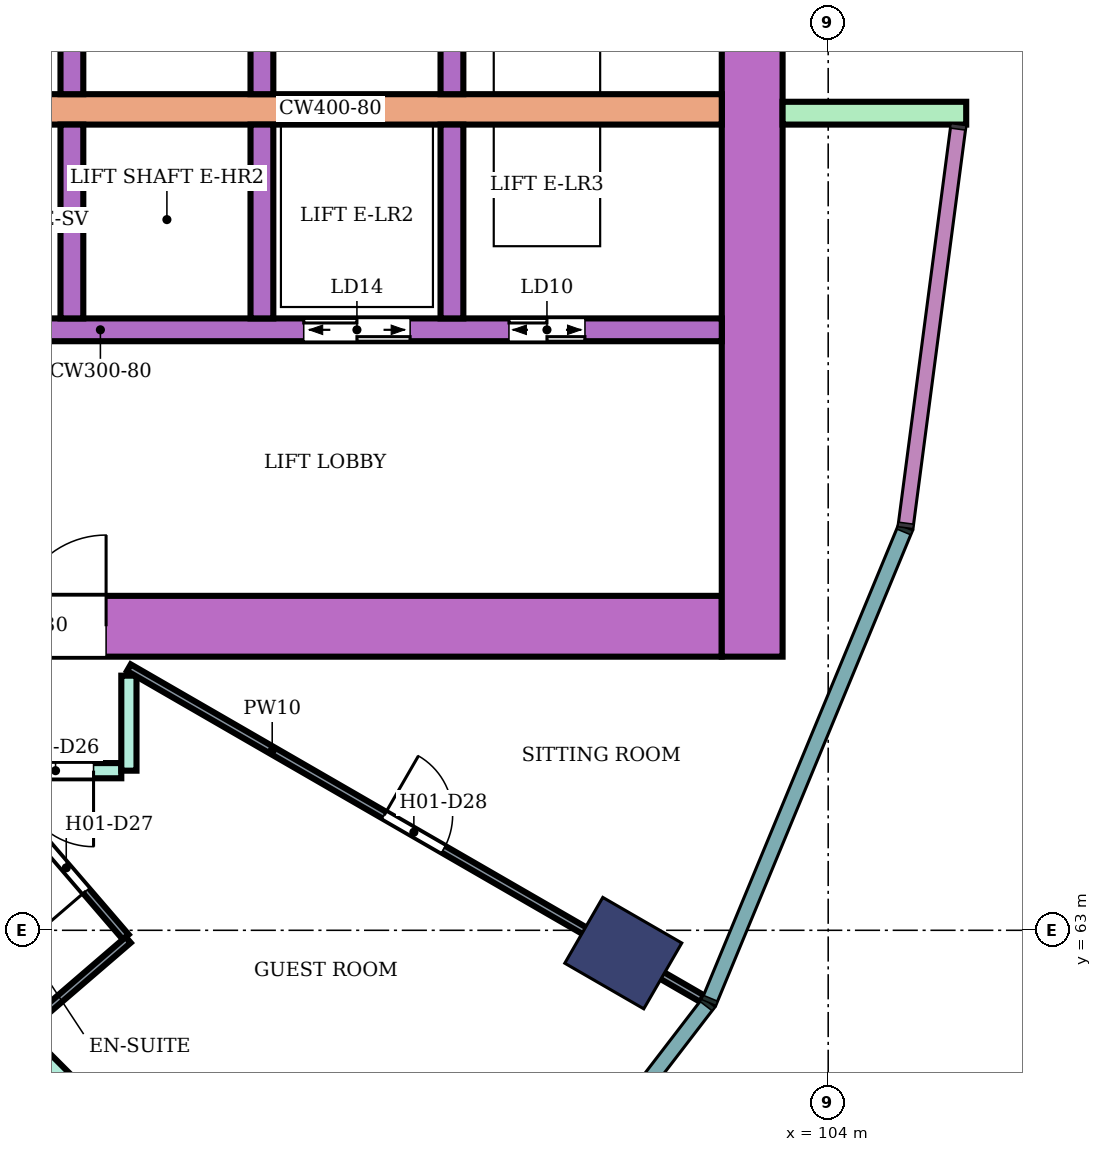
"""IFC4 building model, lengths in metres.
Left out: names, types, materials, properties, quantities, classifications, styles, units other than length and angle.
Written with IfcOpenShell. Run it as: python <this file> out.ifc"""

import sys

from ifc_helpers import new_model, si_unit, direction, frame, frame_2d, origin, origin_2d, place, context, subcontext, project, spatial, rectangle, extrude, element, fill, save


model = new_model("IFC4")
c1 = context("Model", 3, precision=1e-05, world=origin(), true_north=direction((0.0, 1.0)))
c2 = subcontext(c1, "Body", "Model", "MODEL_VIEW")
j1 = project(units=[si_unit("LENGTHUNIT", "METRE"), si_unit("PLANEANGLEUNIT", "RADIAN")], contexts=[c1])
p1 = place(None, origin())
s1 = spatial("IfcSite", under=j1, at=p1, CompositionType="ELEMENT")
p2 = place(p1, origin())
s2 = spatial("IfcBuilding", under=s1, at=p2, CompositionType="ELEMENT")
p3 = place(p2, frame((0.0, 0.0, 36.4)))
s3 = spatial("IfcBuildingStorey", under=s2, at=p3, CompositionType="ELEMENT", Elevation=36.4)
p4 = place(p3, frame((101.304, 62.7, 0.0), z_axis=(0.0, 0.0, 1.0), x_axis=(0.866025403784, -0.5, 0.0)))
e1 = element("IfcColumn", 1, at=p4, inside=s3, PredefinedType="COLUMN", context=c2, shape_type="SweptSolid", body=[
    extrude(rectangle(XDim=1.2, YDim=1.0, at=origin_2d()), origin(), (0.0, 0.0, 1.0), 3.8),
])
p5 = place(p3, frame((87.9, 67.0, 0.0), z_axis=(0.0, 0.0, 1.0), x_axis=(1.0, 0.0, 0.0)))
e2 = element("IfcWall", 2, at=p5, inside=s3, PredefinedType="SHEAR", context=c2, shape_type="SweptSolid", body=[
    extrude(rectangle(XDim=14.7, YDim=0.8, at=frame_2d((7.35, 0.0))), origin(), (0.0, 0.0, 1.0), 3.48),
])
p6 = place(p5, frame((4.2, 0.0, 0.0)))
e3 = element("IfcOpeningElement", 3, at=p6, cuts=e2, PredefinedType="OPENING", context=c2, shape_type="SweptSolid", body=[
    extrude(rectangle(XDim=2.4, YDim=2.4, at=frame_2d((1.2, 1.2))), frame((0.0, 0.41, 0.0), z_axis=(0.0, -1.0, 0.0), x_axis=(1.0, 0.0, 0.0)), (0.0, 0.0, 1.0), 0.82),
])
p7 = place(p3, frame((103.0, 66.6, 0.0), z_axis=(0.0, 0.0, 1.0), x_axis=(0.0, 1.0, 0.0)))
e4 = element("IfcWall", 4, at=p7, inside=s3, PredefinedType="SHEAR", context=c2, shape_type="SweptSolid", body=[
    extrude(rectangle(XDim=16.8, YDim=0.8, at=frame_2d((8.4, 0.0))), origin(), (0.0, 0.0, 1.0), 3.48),
])
p8 = place(p3, frame((91.7, 73.8, 0.0), z_axis=(0.0, 0.0, 1.0), x_axis=(1.0, 0.0, 0.0)))
e5 = element("IfcWall", 5, at=p8, inside=s3, PredefinedType="SHEAR", context=c2, shape_type="SweptSolid", body=[
    extrude(rectangle(XDim=10.9, YDim=0.4, at=frame_2d((5.45, 0.0))), origin(), (0.0, 0.0, 1.0), 3.48),
])
p9 = place(p3, frame((91.7, 70.9, 0.0), z_axis=(0.0, 0.0, 1.0), x_axis=(1.0, 0.0, 0.0)))
e6 = element("IfcWall", 6, at=p9, inside=s3, PredefinedType="SHEAR", context=c2, shape_type="SweptSolid", body=[
    extrude(rectangle(XDim=10.9, YDim=0.3, at=frame_2d((5.45, 0.0))), origin(), (0.0, 0.0, 1.0), 3.48),
])
p10 = place(p9, frame((0.4, 0.0, 0.0)))
e7 = element("IfcOpeningElement", 7, at=p10, cuts=e6, PredefinedType="OPENING", context=c2, shape_type="SweptSolid", body=[
    extrude(rectangle(XDim=1.4, YDim=2.1, at=frame_2d((0.7, 1.05))), frame((0.0, 0.16, 0.0), z_axis=(0.0, -1.0, 0.0), x_axis=(1.0, 0.0, 0.0)), (0.0, 0.0, 1.0), 0.32),
])
p11 = place(p9, frame((5.4, 0.0, 0.0)))
e8 = element("IfcOpeningElement", 8, at=p11, cuts=e6, PredefinedType="OPENING", context=c2, shape_type="SweptSolid", body=[
    extrude(rectangle(XDim=1.4, YDim=2.1, at=frame_2d((0.7, 1.05))), frame((0.0, 0.16, 0.0), z_axis=(0.0, -1.0, 0.0), x_axis=(1.0, 0.0, 0.0)), (0.0, 0.0, 1.0), 0.32),
])
p12 = place(p9, frame((8.1, 0.0, 0.0)))
e9 = element("IfcOpeningElement", 9, at=p12, cuts=e6, PredefinedType="OPENING", context=c2, shape_type="SweptSolid", body=[
    extrude(rectangle(XDim=1.0, YDim=2.1, at=frame_2d((0.5, 1.05))), frame((0.0, 0.16, 0.0), z_axis=(0.0, -1.0, 0.0), x_axis=(1.0, 0.0, 0.0)), (0.0, 0.0, 1.0), 0.32),
])
for number, where, z_axis, x_axis in (
    (10, (94.05, 74.0, 0.0), (0.0, 0.0, 1.0), (0.0, 1.0, 0.0)),
    (11, (96.55, 74.0, 0.0), (0.0, 0.0, 1.0), (0.0, 1.0, 0.0)),
    (12, (99.05, 74.0, 0.0), (0.0, 0.0, 1.0), (0.0, 1.0, 0.0)),
    (13, (94.05, 71.05, 0.0), (0.0, 0.0, 1.0), (0.0, 1.0, 0.0)),
    (14, (96.55, 71.05, 0.0), (0.0, 0.0, 1.0), (0.0, 1.0, 0.0)),
    (15, (99.05, 71.05, 0.0), (0.0, 0.0, 1.0), (0.0, 1.0, 0.0)),
):
    element("IfcWall", number, at=place(p3, frame(where, z_axis=z_axis, x_axis=x_axis)), inside=s3, PredefinedType="SHEAR", context=c2, shape_type="SweptSolid", body=[
        extrude(rectangle(XDim=2.55, YDim=0.3, at=frame_2d((1.275, 0.0))), origin(), (0.0, 0.0, 1.0), 3.48),
    ])
p13 = place(p3, frame((103.4, 73.75, 0.0), z_axis=(0.0, 0.0, 1.0), x_axis=(1.0, 0.0, 0.0)))
e16 = element("IfcWall", 16, at=p13, inside=s3, PredefinedType="NOTDEFINED", context=c2, shape_type="SweptSolid", body=[
    extrude(rectangle(XDim=2.416, YDim=0.3, at=frame_2d((1.208, 0.0))), origin(), (0.0, 0.0, 1.0), 3.8),
])
p14 = place(p3, frame((91.449, 63.548, 0.0), z_axis=(0.0, 0.0, 1.0), x_axis=(0.706984804638, -0.707228736698, 0.0)))
e17 = element("IfcWall", 17, at=p14, inside=s3, PredefinedType="PARTITIONING", context=c2, shape_type="SweptSolid", body=[
    extrude(rectangle(XDim=7.006, YDim=0.2, at=frame_2d((3.503, 0.0))), origin(), (0.0, 0.0, 1.0), 3.35),
])
p15 = place(p3, frame((93.085, 65.1, 0.0), z_axis=(0.0, 0.0, 1.0), x_axis=(1.0, 0.0, 0.0)))
e18 = element("IfcWall", 18, at=p15, inside=s3, PredefinedType="PARTITIONING", context=c2, shape_type="SweptSolid", body=[
    extrude(rectangle(XDim=1.615, YDim=0.2, at=frame_2d((0.808, 0.0))), origin(), (0.0, 0.0, 1.0), 3.35),
])
p16 = place(p15, frame((0.25, 0.0, 0.0)))
e19 = element("IfcOpeningElement", 19, at=p16, cuts=e18, PredefinedType="OPENING", context=c2, shape_type="SweptSolid", body=[
    extrude(rectangle(XDim=1.0, YDim=2.1, at=frame_2d((0.5, 1.05))), frame((0.0, 0.11, 0.0), z_axis=(0.0, -1.0, 0.0), x_axis=(1.0, 0.0, 0.0)), (0.0, 0.0, 1.0), 0.22),
])
p17 = place(p3, frame((94.8, 65.1, 0.0), z_axis=(0.0, 0.0, 1.0), x_axis=(0.0, 1.0, 0.0)))
e20 = element("IfcWall", 20, at=p17, inside=s3, PredefinedType="PARTITIONING", context=c2, shape_type="SweptSolid", body=[
    extrude(rectangle(XDim=1.25, YDim=0.2, at=frame_2d((0.625, 0.0))), origin(), (0.0, 0.0, 1.0), 3.35),
])
p18 = place(p3, frame((92.965, 64.997, 0.0), z_axis=(0.0, 0.0, 1.0), x_axis=(0.652069888227, -0.758158862553, 0.0)))
e21 = element("IfcWall", 21, at=p18, inside=s3, PredefinedType="PARTITIONING", context=c2, shape_type="SweptSolid", body=[
    extrude(rectangle(XDim=2.75, YDim=0.1, at=frame_2d((1.375, 0.0))), origin(), (0.0, 0.0, 1.0), 3.35),
])
p19 = place(p18, frame((1.15, 0.0, 0.0)))
e22 = element("IfcOpeningElement", 22, at=p19, cuts=e21, PredefinedType="OPENING", context=c2, shape_type="SweptSolid", body=[
    extrude(rectangle(XDim=0.8, YDim=2.1, at=frame_2d((0.4, 1.05))), frame((0.0, 0.06, 0.0), z_axis=(0.0, -1.0, 0.0), x_axis=(1.0, 0.0, 0.0)), (0.0, 0.0, 1.0), 0.12),
])
p20 = place(p3, frame((93.435, 61.707, 0.0), z_axis=(0.0, 0.0, 1.0), x_axis=(0.758070495124, 0.652172618578, 0.0)))
e23 = element("IfcWall", 23, at=p20, inside=s3, PredefinedType="PARTITIONING", context=c2, shape_type="SweptSolid", body=[
    extrude(rectangle(XDim=1.789, YDim=0.1, at=frame_2d((0.895, 0.0))), origin(), (0.0, 0.0, 1.0), 3.35),
])
p21 = place(p3, frame((94.8, 66.455, 0.0), z_axis=(0.0, 0.0, 1.0), x_axis=(0.86602264145, -0.500004784474, 0.0)))
e24 = element("IfcWall", 24, at=p21, inside=s3, PredefinedType="PARTITIONING", context=c2, shape_type="SweptSolid", body=[
    extrude(rectangle(XDim=8.708, YDim=0.1, at=frame_2d((4.354, 0.0))), origin(), (0.0, 0.0, 1.0), 3.35),
])
p22 = place(p21, frame((3.879, 0.0, 0.0)))
e25 = element("IfcOpeningElement", 25, at=p22, cuts=e24, PredefinedType="OPENING", context=c2, shape_type="SweptSolid", body=[
    extrude(rectangle(XDim=0.9, YDim=2.1, at=frame_2d((0.45, 1.05))), frame((0.0, 0.06, 0.0), z_axis=(0.0, -1.0, 0.0), x_axis=(1.0, 0.0, 0.0)), (0.0, 0.0, 1.0), 0.12),
])
p23 = place(p16, frame((1.0, 0.0, 0.0), z_axis=(0.0, 0.0, 1.0), x_axis=(-1.0, 0.0, 0.0)))
e26 = element("IfcDoor", 26, at=p23, inside=s3, OperationType="SINGLE_SWING_LEFT", PredefinedType="DOOR", context=c2, shape_type="SweptSolid", body=[
    extrude(rectangle(XDim=1.0, YDim=2.1, at=frame_2d((0.5, 1.05))), frame((0.0, 0.025, 0.0), z_axis=(0.0, -1.0, 0.0), x_axis=(1.0, 0.0, 0.0)), (0.0, 0.0, 1.0), 0.05),
])
fill(e19, e26)
p24 = place(p19, frame((0.8, 0.0, 0.0), z_axis=(0.0, 0.0, 1.0), x_axis=(-1.0, 0.0, 0.0)))
e27 = element("IfcDoor", 27, at=p24, inside=s3, OperationType="SINGLE_SWING_LEFT", PredefinedType="DOOR", context=c2, shape_type="SweptSolid", body=[
    extrude(rectangle(XDim=0.8, YDim=2.1, at=frame_2d((0.4, 1.05))), frame((0.0, 0.025, 0.0), z_axis=(0.0, -1.0, 0.0), x_axis=(1.0, 0.0, 0.0)), (0.0, 0.0, 1.0), 0.05),
])
fill(e22, e27)
p25 = place(p22, origin())
e28 = element("IfcDoor", 28, at=p25, inside=s3, OperationType="SINGLE_SWING_LEFT", PredefinedType="DOOR", context=c2, shape_type="SweptSolid", body=[
    extrude(rectangle(XDim=0.9, YDim=2.1, at=frame_2d((0.45, 1.05))), frame((0.0, 0.025, 0.0), z_axis=(0.0, -1.0, 0.0), x_axis=(1.0, 0.0, 0.0)), (0.0, 0.0, 1.0), 0.05),
])
fill(e25, e28)
p26 = place(p11, origin())
e29 = element("IfcDoor", 29, at=p26, inside=s3, OperationType="DOUBLE_DOOR_SLIDING", PredefinedType="DOOR", context=c2, shape_type="SweptSolid", body=[
    extrude(rectangle(XDim=1.4, YDim=2.1, at=frame_2d((0.7, 1.05))), frame((0.0, 0.025, 0.0), z_axis=(0.0, -1.0, 0.0), x_axis=(1.0, 0.0, 0.0)), (0.0, 0.0, 1.0), 0.05),
])
fill(e8, e29)
p27 = place(p12, origin())
e30 = element("IfcDoor", 30, at=p27, inside=s3, OperationType="DOUBLE_DOOR_SLIDING", PredefinedType="DOOR", context=c2, shape_type="SweptSolid", body=[
    extrude(rectangle(XDim=1.0, YDim=2.1, at=frame_2d((0.5, 1.05))), frame((0.0, 0.025, 0.0), z_axis=(0.0, -1.0, 0.0), x_axis=(1.0, 0.0, 0.0)), (0.0, 0.0, 1.0), 0.05),
])
fill(e9, e30)
p28 = place(p6, origin())
e31 = element("IfcDoor", 31, at=p28, inside=s3, OperationType="DOUBLE_DOOR_SINGLE_SWING", PredefinedType="DOOR", context=c2, shape_type="SweptSolid", body=[
    extrude(rectangle(XDim=2.4, YDim=2.4, at=frame_2d((1.2, 1.2))), frame((0.0, 0.025, 0.0), z_axis=(0.0, -1.0, 0.0), x_axis=(1.0, 0.0, 0.0)), (0.0, 0.0, 1.0), 0.05),
])
fill(e3, e31)
save(model, sys.argv[1])
